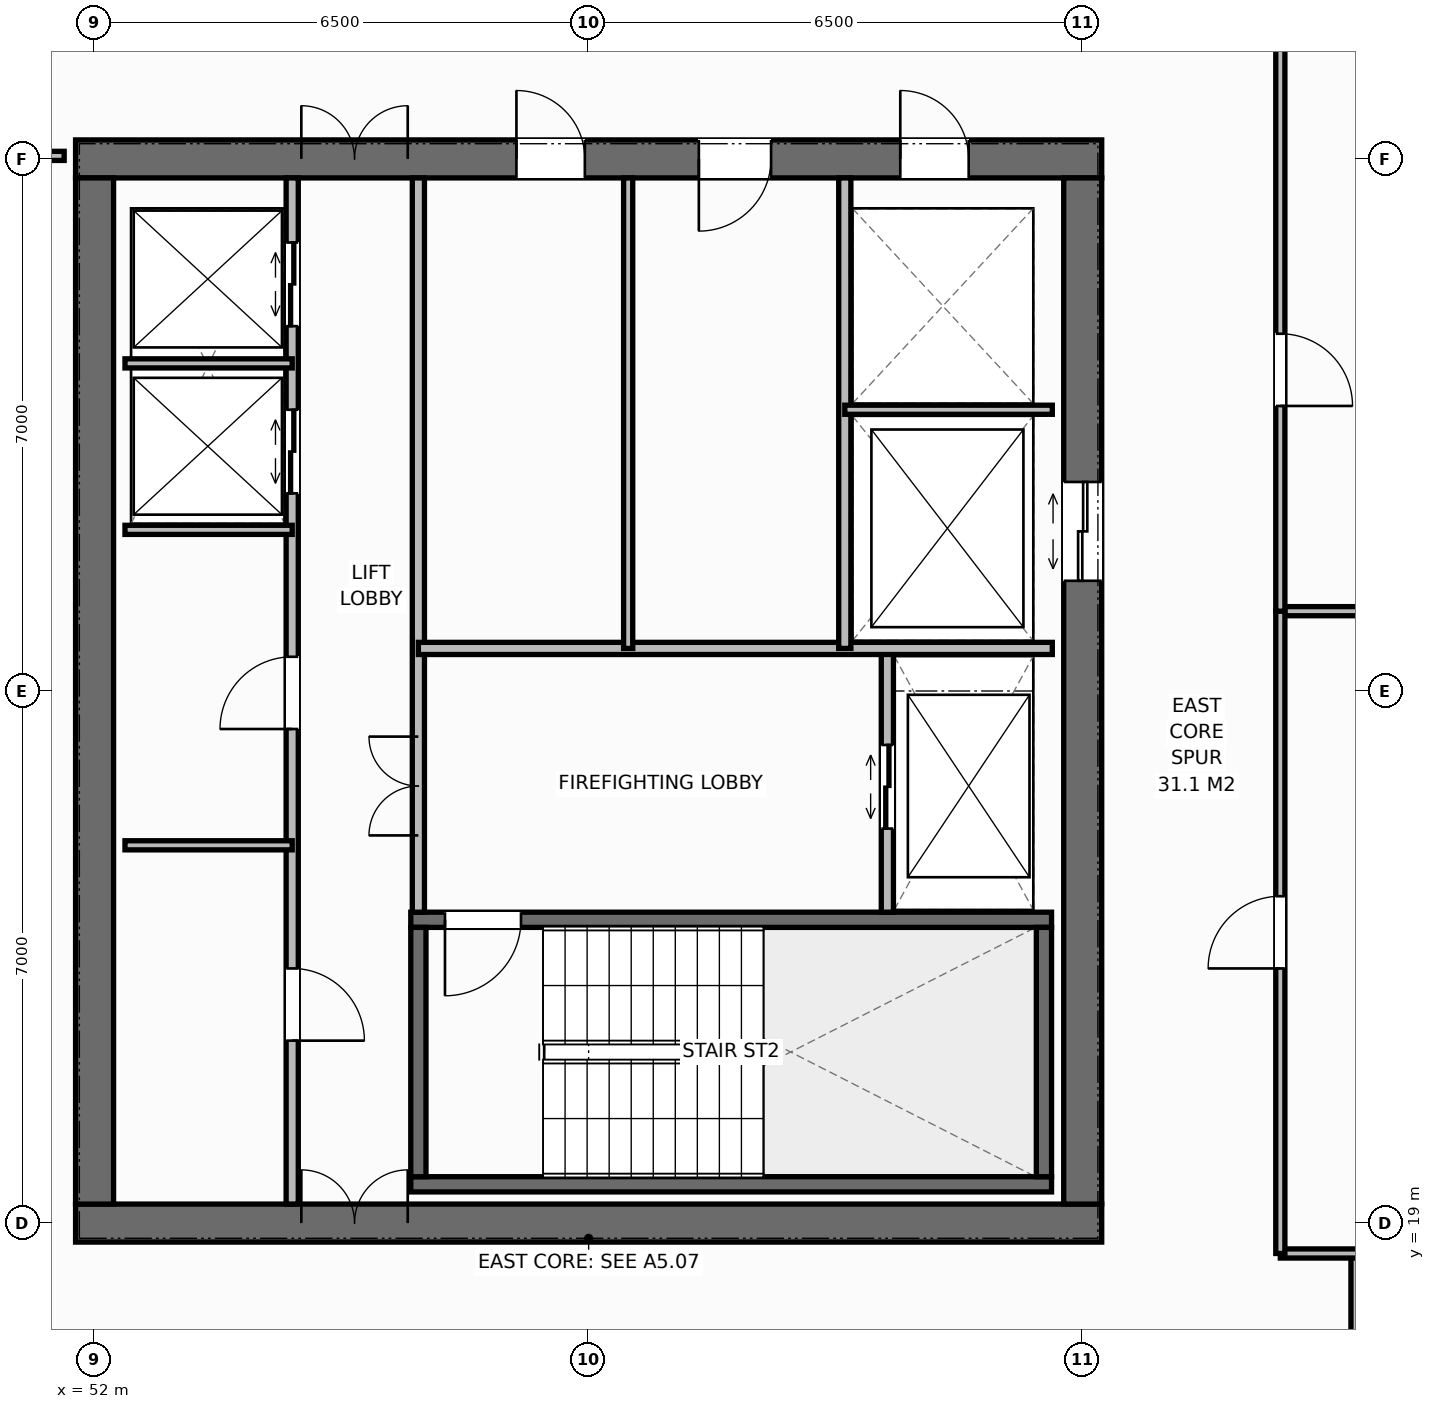
"""IFC4 building model, lengths in metres.
Left out: names, types, materials, properties, quantities, classifications, styles, units other than length and angle.
Written with IfcOpenShell. Run it as: python <this file> out.ifc"""

import sys

from ifc_helpers import new_model, si_unit, direction, frame, frame_2d, origin, place, context, subcontext, project, spatial, rectangle, extrude, element, fill, save


model = new_model("IFC4")
c1 = context("Model", 3, precision=1e-05, world=origin(), true_north=direction((0.0, 1.0)))
c2 = subcontext(c1, "Body", "Model", "MODEL_VIEW")
j1 = project(units=[si_unit("LENGTHUNIT", "METRE"), si_unit("PLANEANGLEUNIT", "RADIAN")], contexts=[c1])
p1 = place(None, origin())
s1 = spatial("IfcSite", under=j1, at=p1, CompositionType="ELEMENT")
p2 = place(p1, origin())
s2 = spatial("IfcBuilding", under=s1, at=p2, CompositionType="ELEMENT")
p3 = place(p2, frame((0.0, 0.0, 267.0)))
s3 = spatial("IfcBuildingStorey", under=s2, at=p3, CompositionType="ELEMENT", Elevation=267.0)
p4 = place(p3, frame((51.75, 19.0, 0.0), z_axis=(0.0, 0.0, 1.0), x_axis=(1.0, 0.0, 0.0)))
e1 = element("IfcWall", 1, at=p4, inside=s3, PredefinedType="SHEAR", context=c2, shape_type="SweptSolid", body=[
    extrude(rectangle(XDim=13.5, YDim=0.5, at=frame_2d((6.75, 0.0))), origin(), (0.0, 0.0, 1.0), 3.8),
])
p5 = place(p4, frame((2.97, 0.0, 0.0)))
e2 = element("IfcOpeningElement", 2, at=p5, cuts=e1, PredefinedType="OPENING", context=c2, shape_type="SweptSolid", body=[
    extrude(rectangle(XDim=1.4, YDim=2.2, at=frame_2d((0.7, 1.1))), frame((0.0, 0.26, 0.0), z_axis=(0.0, -1.0, 0.0), x_axis=(1.0, 0.0, 0.0)), (0.0, 0.0, 1.0), 0.52),
])
p6 = place(p3, frame((51.75, 33.0, 0.0), z_axis=(0.0, 0.0, 1.0), x_axis=(1.0, 0.0, 0.0)))
e3 = element("IfcWall", 3, at=p6, inside=s3, PredefinedType="SHEAR", context=c2, shape_type="SweptSolid", body=[
    extrude(rectangle(XDim=13.5, YDim=0.5, at=frame_2d((6.75, 0.0))), origin(), (0.0, 0.0, 1.0), 3.8),
])
p7 = place(p6, frame((2.97, 0.0, 0.0)))
e4 = element("IfcOpeningElement", 4, at=p7, cuts=e3, PredefinedType="OPENING", context=c2, shape_type="SweptSolid", body=[
    extrude(rectangle(XDim=1.4, YDim=2.2, at=frame_2d((0.7, 1.1))), frame((0.0, 0.26, 0.0), z_axis=(0.0, -1.0, 0.0), x_axis=(1.0, 0.0, 0.0)), (0.0, 0.0, 1.0), 0.52),
])
p8 = place(p6, frame((10.85, 0.0, 0.0)))
e5 = element("IfcOpeningElement", 5, at=p8, cuts=e3, PredefinedType="OPENING", context=c2, shape_type="SweptSolid", body=[
    extrude(rectangle(XDim=0.9, YDim=2.15, at=frame_2d((0.45, 1.075))), frame((0.0, 0.26, 0.0), z_axis=(0.0, -1.0, 0.0), x_axis=(1.0, 0.0, 0.0)), (0.0, 0.0, 1.0), 0.52),
])
p9 = place(p6, frame((5.8, 0.0, 0.0)))
e6 = element("IfcOpeningElement", 6, at=p9, cuts=e3, PredefinedType="OPENING", context=c2, shape_type="SweptSolid", body=[
    extrude(rectangle(XDim=0.9, YDim=2.15, at=frame_2d((0.45, 1.075))), frame((0.0, 0.26, 0.0), z_axis=(0.0, -1.0, 0.0), x_axis=(1.0, 0.0, 0.0)), (0.0, 0.0, 1.0), 0.52),
])
p10 = place(p6, frame((8.2, 0.0, 0.0)))
e7 = element("IfcOpeningElement", 7, at=p10, cuts=e3, PredefinedType="OPENING", context=c2, shape_type="SweptSolid", body=[
    extrude(rectangle(XDim=0.95, YDim=2.15, at=frame_2d((0.475, 1.075))), frame((0.0, 0.26, 0.0), z_axis=(0.0, -1.0, 0.0), x_axis=(1.0, 0.0, 0.0)), (0.0, 0.0, 1.0), 0.52),
])
p11 = place(p3, frame((52.0, 19.25, 0.0), z_axis=(0.0, 0.0, 1.0), x_axis=(0.0, 1.0, 0.0)))
e8 = element("IfcWall", 8, at=p11, inside=s3, PredefinedType="SHEAR", context=c2, shape_type="SweptSolid", body=[
    extrude(rectangle(XDim=13.5, YDim=0.5, at=frame_2d((6.75, 0.0))), origin(), (0.0, 0.0, 1.0), 3.8),
])
p12 = place(p3, frame((65.0, 19.25, 0.0), z_axis=(0.0, 0.0, 1.0), x_axis=(0.0, 1.0, 0.0)))
e9 = element("IfcWall", 9, at=p12, inside=s3, PredefinedType="SHEAR", context=c2, shape_type="SweptSolid", body=[
    extrude(rectangle(XDim=13.5, YDim=0.5, at=frame_2d((6.75, 0.0))), origin(), (0.0, 0.0, 1.0), 3.8),
])
p13 = place(p12, frame((8.2, 0.0, 0.0)))
e10 = element("IfcOpeningElement", 10, at=p13, cuts=e9, PredefinedType="OPENING", context=c2, shape_type="SweptSolid", body=[
    extrude(rectangle(XDim=1.3, YDim=2.2, at=frame_2d((0.65, 1.1))), frame((0.0, 0.26, 0.0), z_axis=(0.0, -1.0, 0.0), x_axis=(1.0, 0.0, 0.0)), (0.0, 0.0, 1.0), 0.52),
])
p14 = place(p3, frame((56.16, 19.51, 0.0), z_axis=(0.0, 0.0, 1.0), x_axis=(1.0, 0.0, 0.0)))
e11 = element("IfcWall", 11, at=p14, inside=s3, PredefinedType="SHEAR", context=c2, shape_type="SweptSolid", body=[
    extrude(rectangle(XDim=8.43, YDim=0.2, at=frame_2d((4.215, 0.0))), origin(), (0.0, 0.0, 1.0), 3.8),
])
p15 = place(p3, frame((56.16, 22.99, 0.0), z_axis=(0.0, 0.0, 1.0), x_axis=(1.0, 0.0, 0.0)))
e12 = element("IfcWall", 12, at=p15, inside=s3, PredefinedType="SHEAR", context=c2, shape_type="SweptSolid", body=[
    extrude(rectangle(XDim=8.43, YDim=0.2, at=frame_2d((4.215, 0.0))), origin(), (0.0, 0.0, 1.0), 3.8),
])
p16 = place(p15, frame((0.45, 0.0, 0.0)))
e13 = element("IfcOpeningElement", 13, at=p16, cuts=e12, PredefinedType="OPENING", context=c2, shape_type="SweptSolid", body=[
    extrude(rectangle(XDim=1.0, YDim=2.15, at=frame_2d((0.5, 1.075))), frame((0.0, 0.11, 0.0), z_axis=(0.0, -1.0, 0.0), x_axis=(1.0, 0.0, 0.0)), (0.0, 0.0, 1.0), 0.22),
])
for number, where, z_axis, x_axis in (
    (14, (56.26, 19.61, 0.0), (0.0, 0.0, 1.0), (0.0, 1.0, 0.0)),
    (15, (64.49, 19.61, 0.0), (0.0, 0.0, 1.0), (0.0, 1.0, 0.0)),
):
    element("IfcWall", number, at=place(p3, frame(where, z_axis=z_axis, x_axis=x_axis)), inside=s3, PredefinedType="SHEAR", context=c2, shape_type="SweptSolid", body=[
        extrude(rectangle(XDim=3.28, YDim=0.2, at=frame_2d((1.64, 0.0))), origin(), (0.0, 0.0, 1.0), 3.8),
    ])
p17 = place(p3, frame((54.6, 19.25, 0.0), z_axis=(0.0, 0.0, 1.0), x_axis=(0.0, 1.0, 0.0)))
e16 = element("IfcWall", 16, at=p17, inside=s3, PredefinedType="STANDARD", context=c2, shape_type="SweptSolid", body=[
    extrude(rectangle(XDim=13.5, YDim=0.16, at=frame_2d((6.75, 0.0))), origin(), (0.0, 0.0, 1.0), 3.588),
])
p18 = place(p17, frame((2.15, 0.0, 0.0)))
e17 = element("IfcOpeningElement", 17, at=p18, cuts=e16, PredefinedType="OPENING", context=c2, shape_type="SweptSolid", body=[
    extrude(rectangle(XDim=0.95, YDim=2.15, at=frame_2d((0.475, 1.075))), frame((0.0, 0.09, 0.0), z_axis=(0.0, -1.0, 0.0), x_axis=(1.0, 0.0, 0.0)), (0.0, 0.0, 1.0), 0.18),
])
p19 = place(p17, frame((6.25, 0.0, 0.0)))
e18 = element("IfcOpeningElement", 18, at=p19, cuts=e16, PredefinedType="OPENING", context=c2, shape_type="SweptSolid", body=[
    extrude(rectangle(XDim=0.95, YDim=2.15, at=frame_2d((0.475, 1.075))), frame((0.0, 0.09, 0.0), z_axis=(0.0, -1.0, 0.0), x_axis=(1.0, 0.0, 0.0)), (0.0, 0.0, 1.0), 0.18),
])
p20 = place(p17, frame((9.35, 0.0, 0.0)))
e19 = element("IfcOpeningElement", 19, at=p20, cuts=e16, PredefinedType="OPENING", context=c2, shape_type="SweptSolid", body=[
    extrude(rectangle(XDim=1.1, YDim=2.2, at=frame_2d((0.55, 1.1))), frame((0.0, 0.09, 0.0), z_axis=(0.0, -1.0, 0.0), x_axis=(1.0, 0.0, 0.0)), (0.0, 0.0, 1.0), 0.18),
])
p21 = place(p17, frame((11.55, 0.0, 0.0)))
e20 = element("IfcOpeningElement", 20, at=p21, cuts=e16, PredefinedType="OPENING", context=c2, shape_type="SweptSolid", body=[
    extrude(rectangle(XDim=1.1, YDim=2.2, at=frame_2d((0.55, 1.1))), frame((0.0, 0.09, 0.0), z_axis=(0.0, -1.0, 0.0), x_axis=(1.0, 0.0, 0.0)), (0.0, 0.0, 1.0), 0.18),
])
p22 = place(p3, frame((56.26, 23.09, 0.0), z_axis=(0.0, 0.0, 1.0), x_axis=(0.0, 1.0, 0.0)))
e21 = element("IfcWall", 21, at=p22, inside=s3, PredefinedType="STANDARD", context=c2, shape_type="SweptSolid", body=[
    extrude(rectangle(XDim=9.66, YDim=0.16, at=frame_2d((4.83, 0.0))), origin(), (0.0, 0.0, 1.0), 3.588),
])
p23 = place(p22, frame((1.01, 0.0, 0.0)))
e22 = element("IfcOpeningElement", 22, at=p23, cuts=e21, PredefinedType="OPENING", context=c2, shape_type="SweptSolid", body=[
    extrude(rectangle(XDim=1.3, YDim=2.2, at=frame_2d((0.65, 1.1))), frame((0.0, 0.09, 0.0), z_axis=(0.0, -1.0, 0.0), x_axis=(1.0, 0.0, 0.0)), (0.0, 0.0, 1.0), 0.18),
])
for number, where, z_axis, x_axis in (
    (23, (52.4, 23.97, 0.0), (0.0, 0.0, 1.0), (1.0, 0.0, 0.0)),
    (24, (52.4, 28.12, 0.0), (0.0, 0.0, 1.0), (1.0, 0.0, 0.0)),
    (25, (52.4, 30.31, 0.0), (0.0, 0.0, 1.0), (1.0, 0.0, 0.0)),
):
    element("IfcWall", number, at=place(p3, frame(where, z_axis=z_axis, x_axis=x_axis)), inside=s3, PredefinedType="PARTITIONING", context=c2, shape_type="SweptSolid", body=[
        extrude(rectangle(XDim=2.2, YDim=0.12, at=frame_2d((1.1, 0.0))), origin(), (0.0, 0.0, 1.0), 3.588),
    ])
p24 = place(p3, frame((62.43, 23.09, 0.0), z_axis=(0.0, 0.0, 1.0), x_axis=(0.0, 1.0, 0.0)))
e26 = element("IfcWall", 26, at=p24, inside=s3, PredefinedType="STANDARD", context=c2, shape_type="SweptSolid", body=[
    extrude(rectangle(XDim=3.47, YDim=0.16, at=frame_2d((1.735, 0.0))), origin(), (0.0, 0.0, 1.0), 3.588),
])
p25 = place(p24, frame((1.1, 0.0, 0.0)))
e27 = element("IfcOpeningElement", 27, at=p25, cuts=e26, PredefinedType="OPENING", context=c2, shape_type="SweptSolid", body=[
    extrude(rectangle(XDim=1.1, YDim=2.2, at=frame_2d((0.55, 1.1))), frame((0.0, 0.09, 0.0), z_axis=(0.0, -1.0, 0.0), x_axis=(1.0, 0.0, 0.0)), (0.0, 0.0, 1.0), 0.18),
])
p26 = place(p3, frame((56.26, 26.56, 0.0), z_axis=(0.0, 0.0, 1.0), x_axis=(1.0, 0.0, 0.0)))
e28 = element("IfcWall", 28, at=p26, inside=s3, PredefinedType="STANDARD", context=c2, shape_type="SweptSolid", body=[
    extrude(rectangle(XDim=8.34, YDim=0.16, at=frame_2d((4.17, 0.0))), origin(), (0.0, 0.0, 1.0), 3.588),
])
p27 = place(p3, frame((61.87, 26.56, 0.0), z_axis=(0.0, 0.0, 1.0), x_axis=(0.0, 1.0, 0.0)))
e29 = element("IfcWall", 29, at=p27, inside=s3, PredefinedType="STANDARD", context=c2, shape_type="SweptSolid", body=[
    extrude(rectangle(XDim=6.19, YDim=0.16, at=frame_2d((3.095, 0.0))), origin(), (0.0, 0.0, 1.0), 3.588),
])
p28 = place(p3, frame((61.87, 29.7, 0.0), z_axis=(0.0, 0.0, 1.0), x_axis=(1.0, 0.0, 0.0)))
e30 = element("IfcWall", 30, at=p28, inside=s3, PredefinedType="PARTITIONING", context=c2, shape_type="SweptSolid", body=[
    extrude(rectangle(XDim=2.73, YDim=0.12, at=frame_2d((1.365, 0.0))), origin(), (0.0, 0.0, 1.0), 3.588),
])
p29 = place(p3, frame((59.02, 26.56, 0.0), z_axis=(0.0, 0.0, 1.0), x_axis=(0.0, 1.0, 0.0)))
e31 = element("IfcWall", 31, at=p29, inside=s3, PredefinedType="PARTITIONING", context=c2, shape_type="SweptSolid", body=[
    extrude(rectangle(XDim=6.19, YDim=0.12, at=frame_2d((3.095, 0.0))), origin(), (0.0, 0.0, 1.0), 3.588),
])
p30 = place(p3, frame((48.0, 33.04, 0.0), z_axis=(0.0, 0.0, 1.0), x_axis=(1.0, 0.0, 0.0)))
e32 = element("IfcWall", 32, at=p30, inside=s3, PredefinedType="PARTITIONING", context=c2, shape_type="SweptSolid", body=[
    extrude(rectangle(XDim=3.6, YDim=0.12, at=frame_2d((1.8, 0.0))), origin(), (0.0, 0.0, 1.0), 3.328),
])
p31 = place(p30, frame((1.1, 0.0, 0.0)))
e33 = element("IfcOpeningElement", 33, at=p31, cuts=e32, PredefinedType="OPENING", context=c2, shape_type="SweptSolid", body=[
    extrude(rectangle(XDim=0.95, YDim=2.15, at=frame_2d((0.475, 1.075))), frame((0.0, 0.07, 0.0), z_axis=(0.0, -1.0, 0.0), x_axis=(1.0, 0.0, 0.0)), (0.0, 0.0, 1.0), 0.14),
])
p32 = place(p3, frame((68.589, 16.5, 0.0), z_axis=(0.0, 0.0, 1.0), x_axis=(0.0, 1.0, 0.0)))
e34 = element("IfcWall", 34, at=p32, inside=s3, PredefinedType="PARTITIONING", context=c2, shape_type="SweptSolid", body=[
    extrude(rectangle(XDim=2.1, YDim=0.12, at=frame_2d((1.05, 0.0))), origin(), (0.0, 0.0, 1.0), 3.588),
])
for number, where, z_axis, x_axis in (
    (35, (67.6, 18.6, 0.0), (0.0, 0.0, 1.0), (1.0, 0.0, 0.0)),
    (36, (67.6, 27.05, 0.0), (0.0, 0.0, 1.0), (1.0, 0.0, 0.0)),
):
    element("IfcWall", number, at=place(p3, frame(where, z_axis=z_axis, x_axis=x_axis)), inside=s3, PredefinedType="PARTITIONING", context=c2, shape_type="SweptSolid", body=[
        extrude(rectangle(XDim=3.595, YDim=0.12, at=frame_2d((1.797, 0.0))), origin(), (0.0, 0.0, 1.0), 3.588),
    ])
p33 = place(p3, frame((67.6, 18.6, 0.0), z_axis=(0.0, 0.0, 1.0), x_axis=(0.0, 1.0, 0.0)))
e37 = element("IfcWall", 37, at=p33, inside=s3, PredefinedType="PARTITIONING", context=c2, shape_type="SweptSolid", body=[
    extrude(rectangle(XDim=8.45, YDim=0.12, at=frame_2d((4.225, 0.0))), origin(), (0.0, 0.0, 1.0), 3.588),
])
p34 = place(p33, frame((3.75, 0.0, 0.0)))
e38 = element("IfcOpeningElement", 38, at=p34, cuts=e37, PredefinedType="OPENING", context=c2, shape_type="SweptSolid", body=[
    extrude(rectangle(XDim=0.95, YDim=2.15, at=frame_2d((0.475, 1.075))), frame((0.0, 0.07, 0.0), z_axis=(0.0, -1.0, 0.0), x_axis=(1.0, 0.0, 0.0)), (0.0, 0.0, 1.0), 0.14),
])
p35 = place(p3, frame((67.6, 27.05, 0.0), z_axis=(0.0, 0.0, 1.0), x_axis=(0.0, 1.0, 0.0)))
e39 = element("IfcWall", 39, at=p35, inside=s3, PredefinedType="PARTITIONING", context=c2, shape_type="SweptSolid", body=[
    extrude(rectangle(XDim=8.45, YDim=0.12, at=frame_2d((4.225, 0.0))), origin(), (0.0, 0.0, 1.0), 3.588),
])
p36 = place(p35, frame((2.7, 0.0, 0.0)))
e40 = element("IfcOpeningElement", 40, at=p36, cuts=e39, PredefinedType="OPENING", context=c2, shape_type="SweptSolid", body=[
    extrude(rectangle(XDim=0.95, YDim=2.15, at=frame_2d((0.475, 1.075))), frame((0.0, 0.07, 0.0), z_axis=(0.0, -1.0, 0.0), x_axis=(1.0, 0.0, 0.0)), (0.0, 0.0, 1.0), 0.14),
])
p37 = place(p5, origin())
e41 = element("IfcDoor", 41, at=p37, inside=s3, OperationType="DOUBLE_DOOR_SINGLE_SWING", PredefinedType="DOOR", context=c2, shape_type="SweptSolid", body=[
    extrude(rectangle(XDim=1.4, YDim=2.2, at=frame_2d((0.7, 1.1))), frame((0.0, 0.075, 0.0), z_axis=(0.0, -1.0, 0.0), x_axis=(1.0, 0.0, 0.0)), (0.0, 0.0, 1.0), 0.05),
])
fill(e2, e41)
p38 = place(p7, origin())
e42 = element("IfcDoor", 42, at=p38, inside=s3, OperationType="DOUBLE_DOOR_SINGLE_SWING", PredefinedType="DOOR", context=c2, shape_type="SweptSolid", body=[
    extrude(rectangle(XDim=1.4, YDim=2.2, at=frame_2d((0.7, 1.1))), frame((0.0, -0.025, 0.0), z_axis=(0.0, -1.0, 0.0), x_axis=(1.0, 0.0, 0.0)), (0.0, 0.0, 1.0), 0.05),
])
fill(e4, e42)
p39 = place(p18, origin())
e43 = element("IfcDoor", 43, at=p39, inside=s3, OperationType="SINGLE_SWING_RIGHT", PredefinedType="DOOR", context=c2, shape_type="SweptSolid", body=[
    extrude(rectangle(XDim=0.95, YDim=2.15, at=frame_2d((0.475, 1.075))), frame((0.0, 0.025, 0.0), z_axis=(0.0, -1.0, 0.0), x_axis=(1.0, 0.0, 0.0)), (0.0, 0.0, 1.0), 0.05),
])
fill(e17, e43)
p40 = place(p19, origin())
e44 = element("IfcDoor", 44, at=p40, inside=s3, OperationType="SINGLE_SWING_LEFT", PredefinedType="DOOR", context=c2, shape_type="SweptSolid", body=[
    extrude(rectangle(XDim=0.95, YDim=2.15, at=frame_2d((0.475, 1.075))), frame((0.0, 0.025, 0.0), z_axis=(0.0, -1.0, 0.0), x_axis=(1.0, 0.0, 0.0)), (0.0, 0.0, 1.0), 0.05),
])
fill(e18, e44)
p41 = place(p20, origin())
e45 = element("IfcDoor", 45, at=p41, inside=s3, OperationType="DOUBLE_DOOR_SLIDING", PredefinedType="DOOR", context=c2, shape_type="SweptSolid", body=[
    extrude(rectangle(XDim=1.1, YDim=2.2, at=frame_2d((0.55, 1.1))), frame((0.0, 0.025, 0.0), z_axis=(0.0, -1.0, 0.0), x_axis=(1.0, 0.0, 0.0)), (0.0, 0.0, 1.0), 0.05),
])
fill(e19, e45)
p42 = place(p21, origin())
e46 = element("IfcDoor", 46, at=p42, inside=s3, OperationType="DOUBLE_DOOR_SLIDING", PredefinedType="DOOR", context=c2, shape_type="SweptSolid", body=[
    extrude(rectangle(XDim=1.1, YDim=2.2, at=frame_2d((0.55, 1.1))), frame((0.0, 0.025, 0.0), z_axis=(0.0, -1.0, 0.0), x_axis=(1.0, 0.0, 0.0)), (0.0, 0.0, 1.0), 0.05),
])
fill(e20, e46)
p43 = place(p16, origin())
e47 = element("IfcDoor", 47, at=p43, inside=s3, OperationType="SINGLE_SWING_RIGHT", PredefinedType="DOOR", context=c2, shape_type="SweptSolid", body=[
    extrude(rectangle(XDim=1.0, YDim=2.15, at=frame_2d((0.5, 1.075))), frame((0.0, 0.025, 0.0), z_axis=(0.0, -1.0, 0.0), x_axis=(1.0, 0.0, 0.0)), (0.0, 0.0, 1.0), 0.05),
])
fill(e13, e47)
p44 = place(p25, origin())
e48 = element("IfcDoor", 48, at=p44, inside=s3, OperationType="DOUBLE_DOOR_SLIDING", PredefinedType="DOOR", context=c2, shape_type="SweptSolid", body=[
    extrude(rectangle(XDim=1.1, YDim=2.2, at=frame_2d((0.55, 1.1))), frame((0.0, 0.025, 0.0), z_axis=(0.0, -1.0, 0.0), x_axis=(1.0, 0.0, 0.0)), (0.0, 0.0, 1.0), 0.05),
])
fill(e27, e48)
p45 = place(p23, origin())
e49 = element("IfcDoor", 49, at=p45, inside=s3, OperationType="DOUBLE_DOOR_SINGLE_SWING", PredefinedType="DOOR", context=c2, shape_type="SweptSolid", body=[
    extrude(rectangle(XDim=1.3, YDim=2.2, at=frame_2d((0.65, 1.1))), frame((0.0, 0.025, 0.0), z_axis=(0.0, -1.0, 0.0), x_axis=(1.0, 0.0, 0.0)), (0.0, 0.0, 1.0), 0.05),
])
fill(e22, e49)
p46 = place(p13, origin())
e50 = element("IfcDoor", 50, at=p46, inside=s3, OperationType="DOUBLE_DOOR_SLIDING", PredefinedType="DOOR", context=c2, shape_type="SweptSolid", body=[
    extrude(rectangle(XDim=1.3, YDim=2.2, at=frame_2d((0.65, 1.1))), frame((0.0, 0.025, 0.0), z_axis=(0.0, -1.0, 0.0), x_axis=(1.0, 0.0, 0.0)), (0.0, 0.0, 1.0), 0.05),
])
fill(e10, e50)
p47 = place(p8, origin())
e51 = element("IfcDoor", 51, at=p47, inside=s3, OperationType="SINGLE_SWING_LEFT", PredefinedType="DOOR", context=c2, shape_type="SweptSolid", body=[
    extrude(rectangle(XDim=0.9, YDim=2.15, at=frame_2d((0.45, 1.075))), frame((0.0, -0.025, 0.0), z_axis=(0.0, -1.0, 0.0), x_axis=(1.0, 0.0, 0.0)), (0.0, 0.0, 1.0), 0.05),
])
fill(e5, e51)
p48 = place(p9, origin())
e52 = element("IfcDoor", 52, at=p48, inside=s3, OperationType="SINGLE_SWING_LEFT", PredefinedType="DOOR", context=c2, shape_type="SweptSolid", body=[
    extrude(rectangle(XDim=0.9, YDim=2.15, at=frame_2d((0.45, 1.075))), frame((0.0, -0.025, 0.0), z_axis=(0.0, -1.0, 0.0), x_axis=(1.0, 0.0, 0.0)), (0.0, 0.0, 1.0), 0.05),
])
fill(e6, e52)
p49 = place(p10, origin())
e53 = element("IfcDoor", 53, at=p49, inside=s3, OperationType="SINGLE_SWING_RIGHT", PredefinedType="DOOR", context=c2, shape_type="SweptSolid", body=[
    extrude(rectangle(XDim=0.95, YDim=2.15, at=frame_2d((0.475, 1.075))), frame((0.0, -0.025, 0.0), z_axis=(0.0, -1.0, 0.0), x_axis=(1.0, 0.0, 0.0)), (0.0, 0.0, 1.0), 0.05),
])
fill(e7, e53)
p50 = place(p34, origin())
e54 = element("IfcDoor", 54, at=p50, inside=s3, OperationType="SINGLE_SWING_LEFT", PredefinedType="DOOR", context=c2, shape_type="SweptSolid", body=[
    extrude(rectangle(XDim=0.95, YDim=2.15, at=frame_2d((0.475, 1.075))), frame((0.0, 0.025, 0.0), z_axis=(0.0, -1.0, 0.0), x_axis=(1.0, 0.0, 0.0)), (0.0, 0.0, 1.0), 0.05),
])
fill(e38, e54)
p51 = place(p36, origin())
e55 = element("IfcDoor", 55, at=p51, inside=s3, OperationType="SINGLE_SWING_RIGHT", PredefinedType="DOOR", context=c2, shape_type="SweptSolid", body=[
    extrude(rectangle(XDim=0.95, YDim=2.15, at=frame_2d((0.475, 1.075))), frame((0.0, 0.025, 0.0), z_axis=(0.0, -1.0, 0.0), x_axis=(1.0, 0.0, 0.0)), (0.0, 0.0, 1.0), 0.05),
])
fill(e40, e55)
save(model, sys.argv[1])
